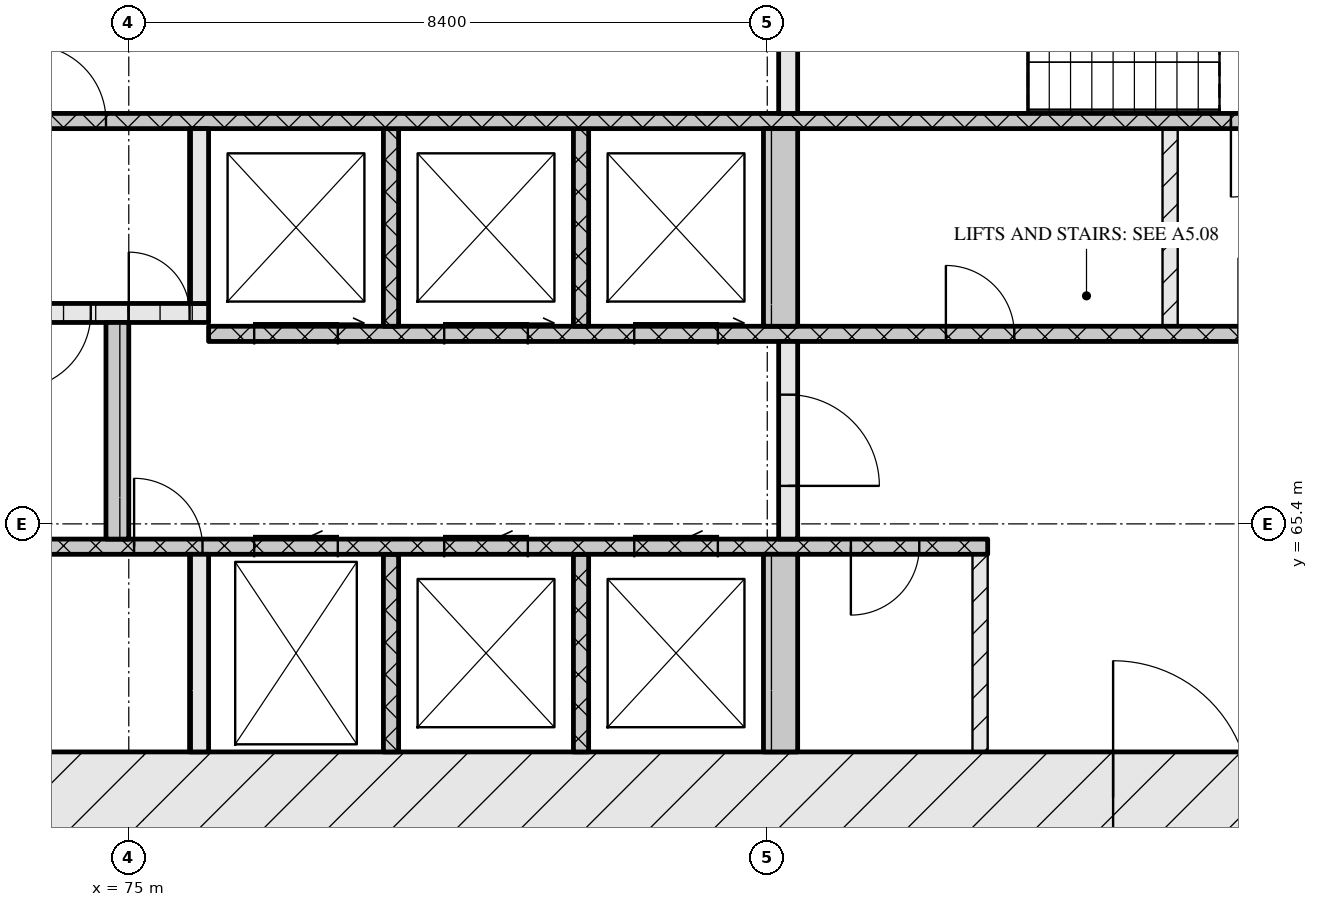
"""IFC4 building model, lengths in metres.
Left out: names, types, materials, properties, quantities, classifications, styles, units other than length and angle.
Written with IfcOpenShell. Run it as: python <this file> out.ifc"""

import sys

from ifc_helpers import new_model, si_unit, direction, frame, frame_2d, origin, place, context, subcontext, project, spatial, rectangle, extrude, element, fill, save


model = new_model("IFC4")
c1 = context("Model", 3, precision=1e-05, world=origin(), true_north=direction((0.0, 1.0)))
c2 = subcontext(c1, "Body", "Model", "MODEL_VIEW")
j1 = project(units=[si_unit("LENGTHUNIT", "METRE"), si_unit("PLANEANGLEUNIT", "RADIAN")], contexts=[c1])
p1 = place(None, origin())
s1 = spatial("IfcSite", under=j1, at=p1, CompositionType="ELEMENT")
p2 = place(p1, origin())
s2 = spatial("IfcBuilding", under=s1, at=p2, CompositionType="ELEMENT")
p3 = place(p2, frame((0.0, 0.0, 48.0)))
s3 = spatial("IfcBuildingStorey", under=s2, at=p3, CompositionType="ELEMENT", Elevation=48.0)
p4 = place(p3, frame((66.6, 61.8, 0.0), z_axis=(0.0, 0.0, 1.0), x_axis=(1.0, 0.0, 0.0)))
e1 = element("IfcWall", 1, at=p4, inside=s3, PredefinedType="SOLIDWALL", context=c2, shape_type="SweptSolid", body=[
    extrude(rectangle(XDim=42.0, YDim=1.2, at=frame_2d((21.0, 0.0))), origin(), (0.0, 0.0, 1.0), 3.32),
])
p5 = place(p4, frame((21.35, 0.0, 0.0)))
e2 = element("IfcOpeningElement", 2, at=p5, cuts=e1, PredefinedType="OPENING", context=c2, shape_type="SweptSolid", body=[
    extrude(rectangle(XDim=1.8, YDim=2.1, at=frame_2d((0.9, 1.05))), frame((0.0, 0.61, 0.0), z_axis=(0.0, -1.0, 0.0), x_axis=(1.0, 0.0, 0.0)), (0.0, 0.0, 1.0), 1.22),
])
p6 = place(p3, frame((75.925, 62.4, 0.0), z_axis=(0.0, 0.0, 1.0), x_axis=(0.0, 1.0, 0.0)))
e3 = element("IfcWall", 3, at=p6, inside=s3, PredefinedType="SOLIDWALL", context=c2, shape_type="SweptSolid", body=[
    extrude(rectangle(XDim=2.6, YDim=0.25, at=frame_2d((1.3, 0.0))), origin(), (0.0, 0.0, 1.0), 3.32),
])
for number, where, z_axis, x_axis in (
    (4, (78.45, 62.4, 0.0), (0.0, 0.0, 1.0), (0.0, 1.0, 0.0)),
    (5, (80.95, 62.4, 0.0), (0.0, 0.0, 1.0), (0.0, 1.0, 0.0)),
):
    element("IfcWall", number, at=place(p3, frame(where, z_axis=z_axis, x_axis=x_axis)), inside=s3, PredefinedType="SOLIDWALL", context=c2, shape_type="SweptSolid", body=[
        extrude(rectangle(XDim=2.6, YDim=0.2, at=frame_2d((1.3, 0.0))), origin(), (0.0, 0.0, 1.0), 3.32),
    ])
p7 = place(p3, frame((83.575, 62.4, 0.0), z_axis=(0.0, 0.0, 1.0), x_axis=(0.0, 1.0, 0.0)))
e6 = element("IfcWall", 6, at=p7, inside=s3, PredefinedType="SOLIDWALL", context=c2, shape_type="SweptSolid", body=[
    extrude(rectangle(XDim=2.6, YDim=0.45, at=frame_2d((1.3, 0.0))), origin(), (0.0, 0.0, 1.0), 3.32),
])
p8 = place(p3, frame((86.2, 62.4, 0.0), z_axis=(0.0, 0.0, 1.0), x_axis=(0.0, 1.0, 0.0)))
e7 = element("IfcWall", 7, at=p8, inside=s3, PredefinedType="PARTITIONING", context=c2, shape_type="SweptSolid", body=[
    extrude(rectangle(XDim=2.6, YDim=0.2, at=frame_2d((1.3, 0.0))), origin(), (0.0, 0.0, 1.0), 3.32),
])
p9 = place(p3, frame((67.8, 65.1, 0.0), z_axis=(0.0, 0.0, 1.0), x_axis=(1.0, 0.0, 0.0)))
e8 = element("IfcWall", 8, at=p9, inside=s3, PredefinedType="SOLIDWALL", context=c2, shape_type="SweptSolid", body=[
    extrude(rectangle(XDim=18.5, YDim=0.2, at=frame_2d((9.25, 0.0))), origin(), (0.0, 0.0, 1.0), 3.32),
])
p10 = place(p9, frame((7.27, 0.0, 0.0)))
e9 = element("IfcOpeningElement", 9, at=p10, cuts=e8, PredefinedType="OPENING", context=c2, shape_type="SweptSolid", body=[
    extrude(rectangle(XDim=0.9, YDim=2.1, at=frame_2d((0.45, 1.05))), frame((0.0, 0.11, 0.0), z_axis=(0.0, -1.0, 0.0), x_axis=(1.0, 0.0, 0.0)), (0.0, 0.0, 1.0), 0.22),
])
p11 = place(p9, frame((8.85, 0.0, 0.0)))
e10 = element("IfcOpeningElement", 10, at=p11, cuts=e8, PredefinedType="OPENING", context=c2, shape_type="SweptSolid", body=[
    extrude(rectangle(XDim=1.1, YDim=2.1, at=frame_2d((0.55, 1.05))), frame((0.0, 0.11, 0.0), z_axis=(0.0, -1.0, 0.0), x_axis=(1.0, 0.0, 0.0)), (0.0, 0.0, 1.0), 0.22),
])
p12 = place(p9, frame((11.35, 0.0, 0.0)))
e11 = element("IfcOpeningElement", 11, at=p12, cuts=e8, PredefinedType="OPENING", context=c2, shape_type="SweptSolid", body=[
    extrude(rectangle(XDim=1.1, YDim=2.1, at=frame_2d((0.55, 1.05))), frame((0.0, 0.11, 0.0), z_axis=(0.0, -1.0, 0.0), x_axis=(1.0, 0.0, 0.0)), (0.0, 0.0, 1.0), 0.22),
])
p13 = place(p9, frame((13.85, 0.0, 0.0)))
e12 = element("IfcOpeningElement", 12, at=p13, cuts=e8, PredefinedType="OPENING", context=c2, shape_type="SweptSolid", body=[
    extrude(rectangle(XDim=1.1, YDim=2.1, at=frame_2d((0.55, 1.05))), frame((0.0, 0.11, 0.0), z_axis=(0.0, -1.0, 0.0), x_axis=(1.0, 0.0, 0.0)), (0.0, 0.0, 1.0), 0.22),
])
p14 = place(p9, frame((16.7, 0.0, 0.0)))
e13 = element("IfcOpeningElement", 13, at=p14, cuts=e8, PredefinedType="OPENING", context=c2, shape_type="SweptSolid", body=[
    extrude(rectangle(XDim=0.9, YDim=2.1, at=frame_2d((0.45, 1.05))), frame((0.0, 0.11, 0.0), z_axis=(0.0, -1.0, 0.0), x_axis=(1.0, 0.0, 0.0)), (0.0, 0.0, 1.0), 0.22),
])
p15 = place(p3, frame((74.85, 65.2, 0.0), z_axis=(0.0, 0.0, 1.0), x_axis=(0.0, 1.0, 0.0)))
e14 = element("IfcWall", 14, at=p15, inside=s3, PredefinedType="SOLIDWALL", context=c2, shape_type="SweptSolid", body=[
    extrude(rectangle(XDim=2.85, YDim=0.3, at=frame_2d((1.425, 0.0))), origin(), (0.0, 0.0, 1.0), 3.32),
])
p16 = place(p3, frame((83.675, 65.2, 0.0), z_axis=(0.0, 0.0, 1.0), x_axis=(0.0, 1.0, 0.0)))
e15 = element("IfcWall", 15, at=p16, inside=s3, PredefinedType="SOLIDWALL", context=c2, shape_type="SweptSolid", body=[
    extrude(rectangle(XDim=2.6, YDim=0.25, at=frame_2d((1.3, 0.0))), origin(), (0.0, 0.0, 1.0), 3.32),
])
p17 = place(p16, frame((0.7, 0.0, 0.0)))
e16 = element("IfcOpeningElement", 16, at=p17, cuts=e15, PredefinedType="OPENING", context=c2, shape_type="SweptSolid", body=[
    extrude(rectangle(XDim=1.2, YDim=2.1, at=frame_2d((0.6, 1.05))), frame((0.0, 0.135, 0.0), z_axis=(0.0, -1.0, 0.0), x_axis=(1.0, 0.0, 0.0)), (0.0, 0.0, 1.0), 0.27),
])
p18 = place(p3, frame((76.05, 67.9, 0.0), z_axis=(0.0, 0.0, 1.0), x_axis=(1.0, 0.0, 0.0)))
e17 = element("IfcWall", 17, at=p18, inside=s3, PredefinedType="SOLIDWALL", context=c2, shape_type="SweptSolid", body=[
    extrude(rectangle(XDim=23.1, YDim=0.2, at=frame_2d((11.55, 0.0))), origin(), (0.0, 0.0, 1.0), 3.32),
])
p19 = place(p18, frame((0.6, 0.0, 0.0)))
e18 = element("IfcOpeningElement", 18, at=p19, cuts=e17, PredefinedType="OPENING", context=c2, shape_type="SweptSolid", body=[
    extrude(rectangle(XDim=1.1, YDim=2.1, at=frame_2d((0.55, 1.05))), frame((0.0, 0.11, 0.0), z_axis=(0.0, -1.0, 0.0), x_axis=(1.0, 0.0, 0.0)), (0.0, 0.0, 1.0), 0.22),
])
p20 = place(p18, frame((3.1, 0.0, 0.0)))
e19 = element("IfcOpeningElement", 19, at=p20, cuts=e17, PredefinedType="OPENING", context=c2, shape_type="SweptSolid", body=[
    extrude(rectangle(XDim=1.1, YDim=2.1, at=frame_2d((0.55, 1.05))), frame((0.0, 0.11, 0.0), z_axis=(0.0, -1.0, 0.0), x_axis=(1.0, 0.0, 0.0)), (0.0, 0.0, 1.0), 0.22),
])
p21 = place(p18, frame((5.6, 0.0, 0.0)))
e20 = element("IfcOpeningElement", 20, at=p21, cuts=e17, PredefinedType="OPENING", context=c2, shape_type="SweptSolid", body=[
    extrude(rectangle(XDim=1.1, YDim=2.1, at=frame_2d((0.55, 1.05))), frame((0.0, 0.11, 0.0), z_axis=(0.0, -1.0, 0.0), x_axis=(1.0, 0.0, 0.0)), (0.0, 0.0, 1.0), 0.22),
])
p22 = place(p18, frame((9.7, 0.0, 0.0)))
e21 = element("IfcOpeningElement", 21, at=p22, cuts=e17, PredefinedType="OPENING", context=c2, shape_type="SweptSolid", body=[
    extrude(rectangle(XDim=0.9, YDim=2.1, at=frame_2d((0.45, 1.05))), frame((0.0, 0.11, 0.0), z_axis=(0.0, -1.0, 0.0), x_axis=(1.0, 0.0, 0.0)), (0.0, 0.0, 1.0), 0.22),
])
p23 = place(p18, frame((13.55, 0.0, 0.0)))
e22 = element("IfcOpeningElement", 22, at=p23, cuts=e17, PredefinedType="OPENING", context=c2, shape_type="SweptSolid", body=[
    extrude(rectangle(XDim=1.0, YDim=2.1, at=frame_2d((0.5, 1.05))), frame((0.0, 0.11, 0.0), z_axis=(0.0, -1.0, 0.0), x_axis=(1.0, 0.0, 0.0)), (0.0, 0.0, 1.0), 0.22),
])
for number, where, z_axis, x_axis in (
    (23, (78.45, 68.0, 0.0), (0.0, 0.0, 1.0), (0.0, 1.0, 0.0)),
    (24, (80.95, 68.0, 0.0), (0.0, 0.0, 1.0), (0.0, 1.0, 0.0)),
):
    element("IfcWall", number, at=place(p3, frame(where, z_axis=z_axis, x_axis=x_axis)), inside=s3, PredefinedType="SOLIDWALL", context=c2, shape_type="SweptSolid", body=[
        extrude(rectangle(XDim=2.6, YDim=0.2, at=frame_2d((1.3, 0.0))), origin(), (0.0, 0.0, 1.0), 3.32),
    ])
p24 = place(p3, frame((83.575, 68.0, 0.0), z_axis=(0.0, 0.0, 1.0), x_axis=(0.0, 1.0, 0.0)))
e25 = element("IfcWall", 25, at=p24, inside=s3, PredefinedType="SOLIDWALL", context=c2, shape_type="SweptSolid", body=[
    extrude(rectangle(XDim=2.6, YDim=0.45, at=frame_2d((1.3, 0.0))), origin(), (0.0, 0.0, 1.0), 3.32),
])
p25 = place(p3, frame((88.7, 68.0, 0.0), z_axis=(0.0, 0.0, 1.0), x_axis=(0.0, 1.0, 0.0)))
e26 = element("IfcWall", 26, at=p25, inside=s3, PredefinedType="PARTITIONING", context=c2, shape_type="SweptSolid", body=[
    extrude(rectangle(XDim=2.6, YDim=0.2, at=frame_2d((1.3, 0.0))), origin(), (0.0, 0.0, 1.0), 3.32),
])
p26 = place(p3, frame((67.8, 68.175, 0.0), z_axis=(0.0, 0.0, 1.0), x_axis=(1.0, 0.0, 0.0)))
e27 = element("IfcWall", 27, at=p26, inside=s3, PredefinedType="SOLIDWALL", context=c2, shape_type="SweptSolid", body=[
    extrude(rectangle(XDim=8.25, YDim=0.25, at=frame_2d((4.125, 0.0))), origin(), (0.0, 0.0, 1.0), 3.32),
])
p27 = place(p26, frame((5.7, 0.0, 0.0)))
e28 = element("IfcOpeningElement", 28, at=p27, cuts=e27, PredefinedType="OPENING", context=c2, shape_type="SweptSolid", body=[
    extrude(rectangle(XDim=1.0, YDim=2.1, at=frame_2d((0.5, 1.05))), frame((0.0, 0.135, 0.0), z_axis=(0.0, -1.0, 0.0), x_axis=(1.0, 0.0, 0.0)), (0.0, 0.0, 1.0), 0.27),
])
p28 = place(p26, frame((7.2, 0.0, 0.0)))
e29 = element("IfcOpeningElement", 29, at=p28, cuts=e27, PredefinedType="OPENING", context=c2, shape_type="SweptSolid", body=[
    extrude(rectangle(XDim=0.8, YDim=2.1, at=frame_2d((0.4, 1.05))), frame((0.0, 0.135, 0.0), z_axis=(0.0, -1.0, 0.0), x_axis=(1.0, 0.0, 0.0)), (0.0, 0.0, 1.0), 0.27),
])
p29 = place(p3, frame((75.925, 68.3, 0.0), z_axis=(0.0, 0.0, 1.0), x_axis=(0.0, 1.0, 0.0)))
e30 = element("IfcWall", 30, at=p29, inside=s3, PredefinedType="SOLIDWALL", context=c2, shape_type="SweptSolid", body=[
    extrude(rectangle(XDim=2.3, YDim=0.25, at=frame_2d((1.15, 0.0))), origin(), (0.0, 0.0, 1.0), 3.32),
])
p30 = place(p3, frame((67.8, 70.7, 0.0), z_axis=(0.0, 0.0, 1.0), x_axis=(1.0, 0.0, 0.0)))
e31 = element("IfcWall", 31, at=p30, inside=s3, PredefinedType="SOLIDWALL", context=c2, shape_type="SweptSolid", body=[
    extrude(rectangle(XDim=39.6, YDim=0.2, at=frame_2d((19.8, 0.0))), origin(), (0.0, 0.0, 1.0), 3.32),
])
p31 = place(p30, frame((0.65, 0.0, 0.0)))
e32 = element("IfcOpeningElement", 32, at=p31, cuts=e31, PredefinedType="OPENING", context=c2, shape_type="SweptSolid", body=[
    extrude(rectangle(XDim=1.1, YDim=2.1, at=frame_2d((0.55, 1.05))), frame((0.0, 0.11, 0.0), z_axis=(0.0, -1.0, 0.0), x_axis=(1.0, 0.0, 0.0)), (0.0, 0.0, 1.0), 0.22),
])
p32 = place(p30, frame((3.25, 0.0, 0.0)))
e33 = element("IfcOpeningElement", 33, at=p32, cuts=e31, PredefinedType="OPENING", context=c2, shape_type="SweptSolid", body=[
    extrude(rectangle(XDim=1.1, YDim=2.1, at=frame_2d((0.55, 1.05))), frame((0.0, 0.11, 0.0), z_axis=(0.0, -1.0, 0.0), x_axis=(1.0, 0.0, 0.0)), (0.0, 0.0, 1.0), 0.22),
])
p33 = place(p30, frame((5.9, 0.0, 0.0)))
e34 = element("IfcOpeningElement", 34, at=p33, cuts=e31, PredefinedType="OPENING", context=c2, shape_type="SweptSolid", body=[
    extrude(rectangle(XDim=1.0, YDim=2.1, at=frame_2d((0.5, 1.05))), frame((0.0, 0.11, 0.0), z_axis=(0.0, -1.0, 0.0), x_axis=(1.0, 0.0, 0.0)), (0.0, 0.0, 1.0), 0.22),
])
p34 = place(p30, frame((21.7, 0.0, 0.0)))
e35 = element("IfcOpeningElement", 35, at=p34, cuts=e31, PredefinedType="OPENING", context=c2, shape_type="SweptSolid", body=[
    extrude(rectangle(XDim=1.0, YDim=2.1, at=frame_2d((0.5, 1.05))), frame((0.0, 0.11, 0.0), z_axis=(0.0, -1.0, 0.0), x_axis=(1.0, 0.0, 0.0)), (0.0, 0.0, 1.0), 0.22),
])
p35 = place(p30, frame((32.7, 0.0, 0.0)))
e36 = element("IfcOpeningElement", 36, at=p35, cuts=e31, PredefinedType="OPENING", context=c2, shape_type="SweptSolid", body=[
    extrude(rectangle(XDim=1.0, YDim=2.1, at=frame_2d((0.5, 1.05))), frame((0.0, 0.11, 0.0), z_axis=(0.0, -1.0, 0.0), x_axis=(1.0, 0.0, 0.0)), (0.0, 0.0, 1.0), 0.22),
])
p36 = place(p30, frame((35.25, 0.0, 0.0)))
e37 = element("IfcOpeningElement", 37, at=p36, cuts=e31, PredefinedType="OPENING", context=c2, shape_type="SweptSolid", body=[
    extrude(rectangle(XDim=1.1, YDim=2.1, at=frame_2d((0.55, 1.05))), frame((0.0, 0.11, 0.0), z_axis=(0.0, -1.0, 0.0), x_axis=(1.0, 0.0, 0.0)), (0.0, 0.0, 1.0), 0.22),
])
p37 = place(p30, frame((37.85, 0.0, 0.0)))
e38 = element("IfcOpeningElement", 38, at=p37, cuts=e31, PredefinedType="OPENING", context=c2, shape_type="SweptSolid", body=[
    extrude(rectangle(XDim=1.1, YDim=2.1, at=frame_2d((0.55, 1.05))), frame((0.0, 0.11, 0.0), z_axis=(0.0, -1.0, 0.0), x_axis=(1.0, 0.0, 0.0)), (0.0, 0.0, 1.0), 0.22),
])
p38 = place(p3, frame((83.675, 70.8, 0.0), z_axis=(0.0, 0.0, 1.0), x_axis=(0.0, 1.0, 0.0)))
e39 = element("IfcWall", 39, at=p38, inside=s3, PredefinedType="SOLIDWALL", context=c2, shape_type="SweptSolid", body=[
    extrude(rectangle(XDim=1.2, YDim=0.25, at=frame_2d((0.6, 0.0))), origin(), (0.0, 0.0, 1.0), 3.32),
])
p39 = place(p5, origin())
e40 = element("IfcDoor", 40, at=p39, inside=s3, OperationType="DOUBLE_DOOR_SINGLE_SWING", PredefinedType="DOOR", context=c2, shape_type="SweptSolid", body=[
    extrude(rectangle(XDim=1.8, YDim=2.1, at=frame_2d((0.9, 1.05))), frame((0.0, 0.025, 0.0), z_axis=(0.0, -1.0, 0.0), x_axis=(1.0, 0.0, 0.0)), (0.0, 0.0, 1.0), 0.05),
])
fill(e2, e40)
p40 = place(p10, origin())
e41 = element("IfcDoor", 41, at=p40, inside=s3, OperationType="SINGLE_SWING_LEFT", PredefinedType="DOOR", context=c2, shape_type="SweptSolid", body=[
    extrude(rectangle(XDim=0.9, YDim=2.1, at=frame_2d((0.45, 1.05))), frame((0.0, 0.025, 0.0), z_axis=(0.0, -1.0, 0.0), x_axis=(1.0, 0.0, 0.0)), (0.0, 0.0, 1.0), 0.05),
])
fill(e9, e41)
p41 = place(p11, origin())
e42 = element("IfcDoor", 42, at=p41, inside=s3, OperationType="SLIDING_TO_LEFT", PredefinedType="DOOR", context=c2, shape_type="SweptSolid", body=[
    extrude(rectangle(XDim=1.1, YDim=2.1, at=frame_2d((0.55, 1.05))), frame((0.0, 0.025, 0.0), z_axis=(0.0, -1.0, 0.0), x_axis=(1.0, 0.0, 0.0)), (0.0, 0.0, 1.0), 0.05),
])
fill(e10, e42)
p42 = place(p12, origin())
e43 = element("IfcDoor", 43, at=p42, inside=s3, OperationType="SLIDING_TO_LEFT", PredefinedType="DOOR", context=c2, shape_type="SweptSolid", body=[
    extrude(rectangle(XDim=1.1, YDim=2.1, at=frame_2d((0.55, 1.05))), frame((0.0, 0.025, 0.0), z_axis=(0.0, -1.0, 0.0), x_axis=(1.0, 0.0, 0.0)), (0.0, 0.0, 1.0), 0.05),
])
fill(e11, e43)
p43 = place(p13, origin())
e44 = element("IfcDoor", 44, at=p43, inside=s3, OperationType="SLIDING_TO_LEFT", PredefinedType="DOOR", context=c2, shape_type="SweptSolid", body=[
    extrude(rectangle(XDim=1.1, YDim=2.1, at=frame_2d((0.55, 1.05))), frame((0.0, 0.025, 0.0), z_axis=(0.0, -1.0, 0.0), x_axis=(1.0, 0.0, 0.0)), (0.0, 0.0, 1.0), 0.05),
])
fill(e12, e44)
p44 = place(p14, origin())
e45 = element("IfcDoor", 45, at=p44, inside=s3, OperationType="SINGLE_SWING_RIGHT", PredefinedType="DOOR", context=c2, shape_type="SweptSolid", body=[
    extrude(rectangle(XDim=0.9, YDim=2.1, at=frame_2d((0.45, 1.05))), frame((0.0, 0.025, 0.0), z_axis=(0.0, -1.0, 0.0), x_axis=(1.0, 0.0, 0.0)), (0.0, 0.0, 1.0), 0.05),
])
fill(e13, e45)
p45 = place(p17, origin())
e46 = element("IfcDoor", 46, at=p45, inside=s3, OperationType="SINGLE_SWING_RIGHT", PredefinedType="DOOR", context=c2, shape_type="SweptSolid", body=[
    extrude(rectangle(XDim=1.2, YDim=2.1, at=frame_2d((0.6, 1.05))), frame((0.0, 0.025, 0.0), z_axis=(0.0, -1.0, 0.0), x_axis=(1.0, 0.0, 0.0)), (0.0, 0.0, 1.0), 0.05),
])
fill(e16, e46)
p46 = place(p19, origin())
e47 = element("IfcDoor", 47, at=p46, inside=s3, OperationType="SLIDING_TO_RIGHT", PredefinedType="DOOR", context=c2, shape_type="SweptSolid", body=[
    extrude(rectangle(XDim=1.1, YDim=2.1, at=frame_2d((0.55, 1.05))), frame((0.0, 0.025, 0.0), z_axis=(0.0, -1.0, 0.0), x_axis=(1.0, 0.0, 0.0)), (0.0, 0.0, 1.0), 0.05),
])
fill(e18, e47)
p47 = place(p20, origin())
e48 = element("IfcDoor", 48, at=p47, inside=s3, OperationType="SLIDING_TO_RIGHT", PredefinedType="DOOR", context=c2, shape_type="SweptSolid", body=[
    extrude(rectangle(XDim=1.1, YDim=2.1, at=frame_2d((0.55, 1.05))), frame((0.0, 0.025, 0.0), z_axis=(0.0, -1.0, 0.0), x_axis=(1.0, 0.0, 0.0)), (0.0, 0.0, 1.0), 0.05),
])
fill(e19, e48)
p48 = place(p21, origin())
e49 = element("IfcDoor", 49, at=p48, inside=s3, OperationType="SLIDING_TO_RIGHT", PredefinedType="DOOR", context=c2, shape_type="SweptSolid", body=[
    extrude(rectangle(XDim=1.1, YDim=2.1, at=frame_2d((0.55, 1.05))), frame((0.0, 0.025, 0.0), z_axis=(0.0, -1.0, 0.0), x_axis=(1.0, 0.0, 0.0)), (0.0, 0.0, 1.0), 0.05),
])
fill(e20, e49)
p49 = place(p22, origin())
e50 = element("IfcDoor", 50, at=p49, inside=s3, OperationType="SINGLE_SWING_LEFT", PredefinedType="DOOR", context=c2, shape_type="SweptSolid", body=[
    extrude(rectangle(XDim=0.9, YDim=2.1, at=frame_2d((0.45, 1.05))), frame((0.0, 0.025, 0.0), z_axis=(0.0, -1.0, 0.0), x_axis=(1.0, 0.0, 0.0)), (0.0, 0.0, 1.0), 0.05),
])
fill(e21, e50)
p50 = place(p27, origin())
e51 = element("IfcDoor", 51, at=p50, inside=s3, OperationType="SINGLE_SWING_RIGHT", PredefinedType="DOOR", context=c2, shape_type="SweptSolid", body=[
    extrude(rectangle(XDim=1.0, YDim=2.1, at=frame_2d((0.5, 1.05))), frame((0.0, 0.025, 0.0), z_axis=(0.0, -1.0, 0.0), x_axis=(1.0, 0.0, 0.0)), (0.0, 0.0, 1.0), 0.05),
])
fill(e28, e51)
p51 = place(p28, origin())
e52 = element("IfcDoor", 52, at=p51, inside=s3, OperationType="SINGLE_SWING_LEFT", PredefinedType="DOOR", context=c2, shape_type="SweptSolid", body=[
    extrude(rectangle(XDim=0.8, YDim=2.1, at=frame_2d((0.4, 1.05))), frame((0.0, 0.025, 0.0), z_axis=(0.0, -1.0, 0.0), x_axis=(1.0, 0.0, 0.0)), (0.0, 0.0, 1.0), 0.05),
])
fill(e29, e52)
p52 = place(p33, origin())
e53 = element("IfcDoor", 53, at=p52, inside=s3, OperationType="SINGLE_SWING_LEFT", PredefinedType="DOOR", context=c2, shape_type="SweptSolid", body=[
    extrude(rectangle(XDim=1.0, YDim=2.1, at=frame_2d((0.5, 1.05))), frame((0.0, 0.025, 0.0), z_axis=(0.0, -1.0, 0.0), x_axis=(1.0, 0.0, 0.0)), (0.0, 0.0, 1.0), 0.05),
])
fill(e34, e53)
p53 = place(p34, origin())
e54 = element("IfcDoor", 54, at=p53, inside=s3, OperationType="SINGLE_SWING_RIGHT", PredefinedType="DOOR", context=c2, shape_type="SweptSolid", body=[
    extrude(rectangle(XDim=1.0, YDim=2.1, at=frame_2d((0.5, 1.05))), frame((0.0, 0.025, 0.0), z_axis=(0.0, -1.0, 0.0), x_axis=(1.0, 0.0, 0.0)), (0.0, 0.0, 1.0), 0.05),
])
fill(e35, e54)
save(model, sys.argv[1])
